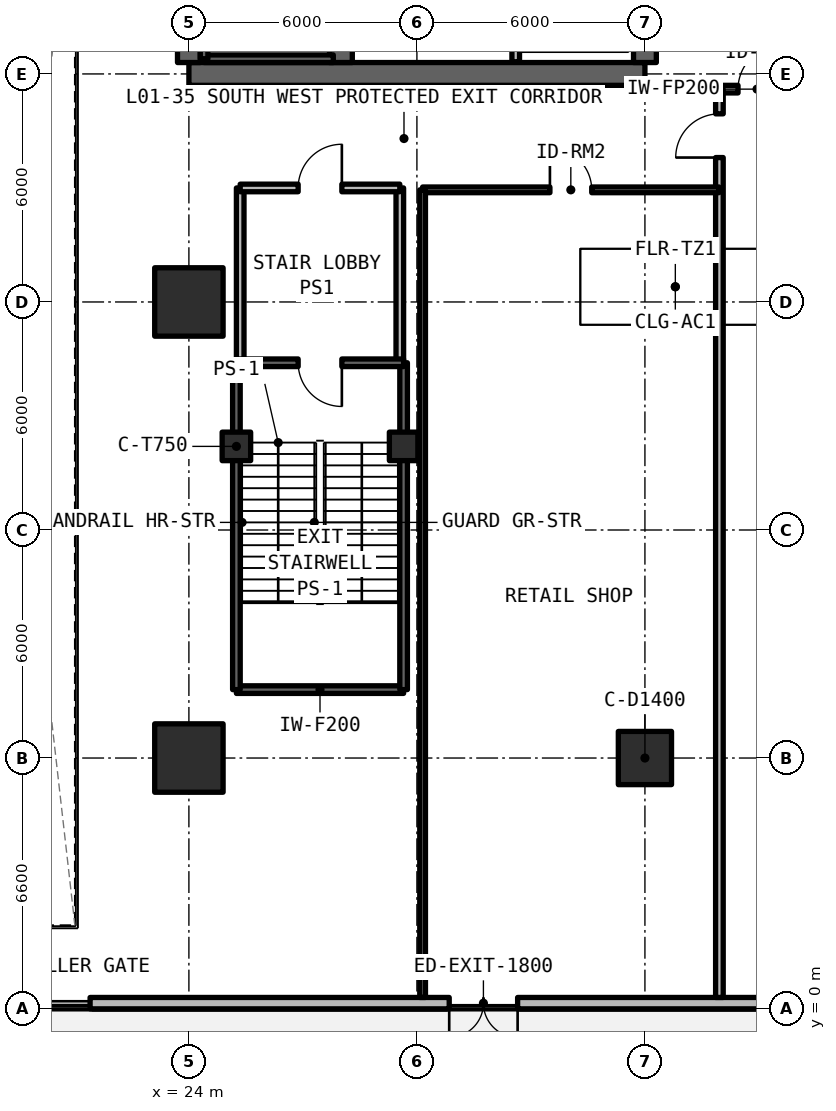
"""IFC4 building model, lengths in metres.
Left out: names, types, materials, properties, quantities, classifications, styles, units other than length and angle.
Written with IfcOpenShell. Run it as: python <this file> out.ifc"""

import sys

from ifc_helpers import new_model, si_unit, direction, frame, frame_2d, origin, origin_2d, place, context, subcontext, project, spatial, rectangle, circle, extrude, element, fill, save


model = new_model("IFC4")
c1 = context("Model", 3, precision=1e-05, world=origin(), true_north=direction((0.0, 1.0)))
c2 = subcontext(c1, "Body", "Model", "MODEL_VIEW")
j1 = project(units=[si_unit("LENGTHUNIT", "METRE"), si_unit("PLANEANGLEUNIT", "RADIAN")], contexts=[c1])
p1 = place(None, origin())
s1 = spatial("IfcSite", under=j1, at=p1, CompositionType="ELEMENT")
p2 = place(p1, origin())
s2 = spatial("IfcBuilding", under=s1, at=p2, CompositionType="ELEMENT")
p3 = place(p2, origin())
s3 = spatial("IfcBuildingStorey", under=s2, at=p3, CompositionType="ELEMENT", Elevation=0.0)
p4 = place(p3, frame((24.0, 24.6, 0.0), z_axis=(0.0, 0.0, 1.0), x_axis=(1.0, 0.0, 0.0)))
e1 = element("IfcWall", 1, at=p4, inside=s3, PredefinedType="SHEAR", context=c2, shape_type="SweptSolid", body=[
    extrude(rectangle(XDim=12.0, YDim=0.6, at=frame_2d((6.0, 0.0))), origin(), (0.0, 0.0, 1.0), 4.95),
])
p5 = place(p3, frame((24.0, 24.9, 0.0), z_axis=(0.0, 0.0, 1.0), x_axis=(0.0, 1.0, 0.0)))
e2 = element("IfcWall", 2, at=p5, inside=s3, PredefinedType="SHEAR", context=c2, shape_type="SweptSolid", body=[
    extrude(rectangle(XDim=17.4, YDim=0.6, at=frame_2d((8.7, 0.0))), origin(), (0.0, 0.0, 1.0), 4.95),
])
p6 = place(p3, frame((36.0, 24.9, 0.0), z_axis=(0.0, 0.0, 1.0), x_axis=(0.0, 1.0, 0.0)))
e3 = element("IfcWall", 3, at=p6, inside=s3, PredefinedType="SHEAR", context=c2, shape_type="SweptSolid", body=[
    extrude(rectangle(XDim=8.9, YDim=0.6, at=frame_2d((4.45, 0.0))), origin(), (0.0, 0.0, 1.0), 4.95),
])
p7 = place(p3, frame((28.0, 24.9, 0.0), z_axis=(0.0, 0.0, 1.0), x_axis=(0.0, 1.0, 0.0)))
e4 = element("IfcWall", 4, at=p7, inside=s3, PredefinedType="SHEAR", context=c2, shape_type="SweptSolid", body=[
    extrude(rectangle(XDim=17.4, YDim=0.6, at=frame_2d((8.7, 0.0))), origin(), (0.0, 0.0, 1.0), 4.95),
])
p8 = place(p7, frame((0.35, 0.0, 0.0)))
e5 = element("IfcOpeningElement", 5, at=p8, cuts=e4, PredefinedType="OPENING", context=c2, shape_type="SweptSolid", body=[
    extrude(rectangle(XDim=1.15, YDim=2.15, at=frame_2d((0.575, 1.075))), frame((0.0, 0.31, 0.0), z_axis=(0.0, -1.0, 0.0), x_axis=(1.0, 0.0, 0.0)), (0.0, 0.0, 1.0), 0.62),
])
p9 = place(p7, frame((9.55, 0.0, 0.0)))
e6 = element("IfcOpeningElement", 6, at=p9, cuts=e4, PredefinedType="OPENING", context=c2, shape_type="SweptSolid", body=[
    extrude(rectangle(XDim=1.15, YDim=2.15, at=frame_2d((0.575, 1.075))), frame((0.0, 0.31, 0.0), z_axis=(0.0, -1.0, 0.0), x_axis=(1.0, 0.0, 0.0)), (0.0, 0.0, 1.0), 0.62),
])
p10 = place(p3, frame((24.0, 6.6, 0.0), z_axis=(0.0, 0.0, 1.0), x_axis=(1.0, 0.0, 0.0)))
e7 = element("IfcColumn", 7, at=p10, inside=s3, PredefinedType="COLUMN", context=c2, shape_type="SweptSolid", body=[
    extrude(rectangle(XDim=1.8, YDim=1.8, at=origin_2d()), origin(), (0.0, 0.0, 1.0), 4.95),
])
p11 = place(p3, frame((36.0, 6.6, 0.0), z_axis=(0.0, 0.0, 1.0), x_axis=(1.0, 0.0, 0.0)))
e8 = element("IfcColumn", 8, at=p11, inside=s3, PredefinedType="COLUMN", context=c2, shape_type="SweptSolid", body=[
    extrude(circle(Radius=0.7, at=origin_2d()), origin(), (0.0, 0.0, 1.0), 4.95),
])
p12 = place(p3, frame((24.0, 18.6, 0.0), z_axis=(0.0, 0.0, 1.0), x_axis=(1.0, 0.0, 0.0)))
e9 = element("IfcColumn", 9, at=p12, inside=s3, PredefinedType="COLUMN", context=c2, shape_type="SweptSolid", body=[
    extrude(rectangle(XDim=1.8, YDim=1.8, at=origin_2d()), origin(), (0.0, 0.0, 1.0), 4.95),
])
for number, where, z_axis, x_axis in (
    (10, (25.25, 14.8, 0.0), (0.0, 0.0, 1.0), (1.0, 0.0, 0.0)),
    (11, (29.65, 14.8, 0.0), (0.0, 0.0, 1.0), (1.0, 0.0, 0.0)),
):
    element("IfcColumn", number, at=place(p3, frame(where, z_axis=z_axis, x_axis=x_axis)), inside=s3, PredefinedType="COLUMN", context=c2, shape_type="SweptSolid", body=[
        extrude(rectangle(XDim=0.75, YDim=0.75, at=origin_2d()), origin(), (0.0, 0.0, 1.0), 4.95),
    ])
p13 = place(p3, frame((0.15, 0.15, 0.0), z_axis=(0.0, 0.0, 1.0), x_axis=(1.0, 0.0, 0.0)))
e12 = element("IfcWall", 12, at=p13, inside=s3, PredefinedType="SOLIDWALL", context=c2, shape_type="SweptSolid", body=[
    extrude(rectangle(XDim=113.7, YDim=0.3, at=frame_2d((56.85, 0.0))), origin(), (0.0, 0.0, 1.0), 4.67),
])
p14 = place(p13, frame((5.75, 0.0, 0.0)))
e13 = element("IfcOpeningElement", 13, at=p14, cuts=e12, PredefinedType="OPENING", context=c2, shape_type="SweptSolid", body=[
    extrude(rectangle(XDim=1.2, YDim=2.2, at=frame_2d((0.6, 1.1))), frame((0.0, 0.16, 0.0), z_axis=(0.0, -1.0, 0.0), x_axis=(1.0, 0.0, 0.0)), (0.0, 0.0, 1.0), 0.32),
])
p15 = place(p13, frame((17.05, 0.0, 0.0)))
e14 = element("IfcOpeningElement", 14, at=p15, cuts=e12, PredefinedType="OPENING", context=c2, shape_type="SweptSolid", body=[
    extrude(rectangle(XDim=4.2, YDim=3.2, at=frame_2d((2.1, 1.6))), frame((0.0, 0.16, 0.0), z_axis=(0.0, -1.0, 0.0), x_axis=(1.0, 0.0, 0.0)), (0.0, 0.0, 1.0), 0.32),
])
p16 = place(p13, frame((30.7, 0.0, 0.0)))
e15 = element("IfcOpeningElement", 15, at=p16, cuts=e12, PredefinedType="OPENING", context=c2, shape_type="SweptSolid", body=[
    extrude(rectangle(XDim=1.8, YDim=2.25, at=frame_2d((0.9, 1.125))), frame((0.0, 0.16, 0.0), z_axis=(0.0, -1.0, 0.0), x_axis=(1.0, 0.0, 0.0)), (0.0, 0.0, 1.0), 0.32),
])
p17 = place(p13, frame((40.95, 0.0, 0.0)))
e16 = element("IfcOpeningElement", 16, at=p17, cuts=e12, PredefinedType="OPENING", context=c2, shape_type="SweptSolid", body=[
    extrude(rectangle(XDim=1.8, YDim=2.25, at=frame_2d((0.9, 1.125))), frame((0.0, 0.16, 0.0), z_axis=(0.0, -1.0, 0.0), x_axis=(1.0, 0.0, 0.0)), (0.0, 0.0, 1.0), 0.32),
])
p18 = place(p13, frame((55.75, 0.0, 0.0)))
e17 = element("IfcOpeningElement", 17, at=p18, cuts=e12, PredefinedType="OPENING", context=c2, shape_type="SweptSolid", body=[
    extrude(rectangle(XDim=2.2, YDim=2.6, at=frame_2d((1.1, 1.3))), frame((0.0, 0.16, 0.0), z_axis=(0.0, -1.0, 0.0), x_axis=(1.0, 0.0, 0.0)), (0.0, 0.0, 1.0), 0.32),
])
p19 = place(p13, frame((74.45, 0.0, 0.0)))
e18 = element("IfcOpeningElement", 18, at=p19, cuts=e12, PredefinedType="OPENING", context=c2, shape_type="SweptSolid", body=[
    extrude(rectangle(XDim=1.8, YDim=2.25, at=frame_2d((0.9, 1.125))), frame((0.0, 0.16, 0.0), z_axis=(0.0, -1.0, 0.0), x_axis=(1.0, 0.0, 0.0)), (0.0, 0.0, 1.0), 0.32),
])
p20 = place(p13, frame((106.25, 0.0, 0.0)))
e19 = element("IfcOpeningElement", 19, at=p20, cuts=e12, PredefinedType="OPENING", context=c2, shape_type="SweptSolid", body=[
    extrude(rectangle(XDim=1.2, YDim=2.2, at=frame_2d((0.6, 1.1))), frame((0.0, 0.16, 0.0), z_axis=(0.0, -1.0, 0.0), x_axis=(1.0, 0.0, 0.0)), (0.0, 0.0, 1.0), 0.32),
])
p21 = place(p13, frame((68.18, 0.0, 0.78)))
e20 = element("IfcOpeningElement", 20, at=p21, cuts=e12, PredefinedType="OPENING", context=c2, shape_type="SweptSolid", body=[
    extrude(rectangle(XDim=2.4, YDim=1.66, at=frame_2d((1.2, 0.83))), frame((0.0, 0.16, 0.0), z_axis=(0.0, -1.0, 0.0), x_axis=(1.0, 0.0, 0.0)), (0.0, 0.0, 1.0), 0.32),
])
p22 = place(p13, frame((8.15, 0.0, 0.78)))
e21 = element("IfcOpeningElement", 21, at=p22, cuts=e12, PredefinedType="OPENING", context=c2, shape_type="SweptSolid", body=[
    extrude(rectangle(XDim=2.4, YDim=1.66, at=frame_2d((1.2, 0.83))), frame((0.0, 0.16, 0.0), z_axis=(0.0, -1.0, 0.0), x_axis=(1.0, 0.0, 0.0)), (0.0, 0.0, 1.0), 0.32),
])
p23 = place(p13, frame((84.15, 0.0, 0.78)))
e22 = element("IfcOpeningElement", 22, at=p23, cuts=e12, PredefinedType="OPENING", context=c2, shape_type="SweptSolid", body=[
    extrude(rectangle(XDim=2.4, YDim=1.66, at=frame_2d((1.2, 0.83))), frame((0.0, 0.16, 0.0), z_axis=(0.0, -1.0, 0.0), x_axis=(1.0, 0.0, 0.0)), (0.0, 0.0, 1.0), 0.32),
])
p24 = place(p13, frame((93.65, 0.0, 0.78)))
e23 = element("IfcOpeningElement", 23, at=p24, cuts=e12, PredefinedType="OPENING", context=c2, shape_type="SweptSolid", body=[
    extrude(rectangle(XDim=2.4, YDim=1.66, at=frame_2d((1.2, 0.83))), frame((0.0, 0.16, 0.0), z_axis=(0.0, -1.0, 0.0), x_axis=(1.0, 0.0, 0.0)), (0.0, 0.0, 1.0), 0.32),
])
p25 = place(p13, frame((103.15, 0.0, 0.78)))
e24 = element("IfcOpeningElement", 24, at=p25, cuts=e12, PredefinedType="OPENING", context=c2, shape_type="SweptSolid", body=[
    extrude(rectangle(XDim=2.4, YDim=1.66, at=frame_2d((1.2, 0.83))), frame((0.0, 0.16, 0.0), z_axis=(0.0, -1.0, 0.0), x_axis=(1.0, 0.0, 0.0)), (0.0, 0.0, 1.0), 0.32),
])
p26 = place(p3, frame((32.6, 24.92, 0.0), z_axis=(0.0, 0.0, 1.0), x_axis=(0.0, 1.0, 0.0)))
e25 = element("IfcWall", 25, at=p26, inside=s3, PredefinedType="SOLIDWALL", context=c2, shape_type="SweptSolid", body=[
    extrude(rectangle(XDim=3.58, YDim=0.2, at=frame_2d((1.79, 0.0))), origin(), (0.0, 0.0, 1.0), 3.89),
])
p27 = place(p26, frame((1.3, 0.0, 0.0)))
e26 = element("IfcOpeningElement", 26, at=p27, cuts=e25, PredefinedType="OPENING", context=c2, shape_type="SweptSolid", body=[
    extrude(rectangle(XDim=1.1, YDim=2.2, at=frame_2d((0.55, 1.1))), frame((0.0, 0.11, 0.0), z_axis=(0.0, -1.0, 0.0), x_axis=(1.0, 0.0, 0.0)), (0.0, 0.0, 1.0), 0.22),
])
p28 = place(p3, frame((38.0, 24.2, 0.0), z_axis=(0.0, 0.0, 1.0), x_axis=(1.0, 0.0, 0.0)))
e27 = element("IfcWall", 27, at=p28, inside=s3, PredefinedType="SOLIDWALL", context=c2, shape_type="SweptSolid", body=[
    extrude(rectangle(XDim=1.9, YDim=0.2, at=frame_2d((0.95, 0.0))), origin(), (0.0, 0.0, 1.0), 3.89),
])
p29 = place(p28, frame((0.45, 0.0, 0.0)))
e28 = element("IfcOpeningElement", 28, at=p29, cuts=e27, PredefinedType="OPENING", context=c2, shape_type="SweptSolid", body=[
    extrude(rectangle(XDim=1.15, YDim=2.15, at=frame_2d((0.575, 1.075))), frame((0.0, 0.11, 0.0), z_axis=(0.0, -1.0, 0.0), x_axis=(1.0, 0.0, 0.0)), (0.0, 0.0, 1.0), 0.22),
])
for number, where, z_axis, x_axis in (
    (29, (25.35, 17.0, 0.0), (0.0, 0.0, 1.0), (0.0, 1.0, 0.0)),
    (30, (29.55, 17.0, 0.0), (0.0, 0.0, 1.0), (0.0, 1.0, 0.0)),
):
    element("IfcWall", number, at=place(p3, frame(where, z_axis=z_axis, x_axis=x_axis)), inside=s3, PredefinedType="SOLIDWALL", context=c2, shape_type="SweptSolid", body=[
        extrude(rectangle(XDim=4.6, YDim=0.2, at=frame_2d((2.3, 0.0))), origin(), (0.0, 0.0, 1.0), 3.89),
    ])
p30 = place(p3, frame((25.35, 21.6, 0.0), z_axis=(0.0, 0.0, 1.0), x_axis=(1.0, 0.0, 0.0)))
e31 = element("IfcWall", 31, at=p30, inside=s3, PredefinedType="SOLIDWALL", context=c2, shape_type="SweptSolid", body=[
    extrude(rectangle(XDim=4.2, YDim=0.2, at=frame_2d((2.1, 0.0))), origin(), (0.0, 0.0, 1.0), 3.89),
])
p31 = place(p30, frame((1.525, 0.0, 0.0)))
e32 = element("IfcOpeningElement", 32, at=p31, cuts=e31, PredefinedType="OPENING", context=c2, shape_type="SweptSolid", body=[
    extrude(rectangle(XDim=1.15, YDim=2.15, at=frame_2d((0.575, 1.075))), frame((0.0, 0.11, 0.0), z_axis=(0.0, -1.0, 0.0), x_axis=(1.0, 0.0, 0.0)), (0.0, 0.0, 1.0), 0.22),
])
p32 = place(p3, frame((37.96, 0.3, 0.0), z_axis=(0.0, 0.0, 1.0), x_axis=(0.0, 1.0, 0.0)))
e33 = element("IfcWall", 33, at=p32, inside=s3, PredefinedType="SOLIDWALL", context=c2, shape_type="SweptSolid", body=[
    extrude(rectangle(XDim=23.9, YDim=0.2, at=frame_2d((11.95, 0.0))), origin(), (0.0, 0.0, 1.0), 3.89),
])
p33 = place(p32, frame((22.1, 0.0, 0.0)))
e34 = element("IfcOpeningElement", 34, at=p33, cuts=e33, PredefinedType="OPENING", context=c2, shape_type="SweptSolid", body=[
    extrude(rectangle(XDim=1.15, YDim=2.15, at=frame_2d((0.575, 1.075))), frame((0.0, 0.11, 0.0), z_axis=(0.0, -1.0, 0.0), x_axis=(1.0, 0.0, 0.0)), (0.0, 0.0, 1.0), 0.22),
])
p34 = place(p3, frame((30.15, 21.55, 0.0), z_axis=(0.0, 0.0, 1.0), x_axis=(1.0, 0.0, 0.0)))
e35 = element("IfcWall", 35, at=p34, inside=s3, PredefinedType="SOLIDWALL", context=c2, shape_type="SweptSolid", body=[
    extrude(rectangle(XDim=7.8, YDim=0.15, at=frame_2d((3.9, 0.0))), origin(), (0.0, 0.0, 1.0), 3.89),
])
p35 = place(p34, frame((3.35, 0.0, 0.0)))
e36 = element("IfcOpeningElement", 36, at=p35, cuts=e35, PredefinedType="OPENING", context=c2, shape_type="SweptSolid", body=[
    extrude(rectangle(XDim=1.1, YDim=2.15, at=frame_2d((0.55, 1.075))), frame((0.0, 0.085, 0.0), z_axis=(0.0, -1.0, 0.0), x_axis=(1.0, 0.0, 0.0)), (0.0, 0.0, 1.0), 0.17),
])
p36 = place(p3, frame((30.15, 0.3, 0.0), z_axis=(0.0, 0.0, 1.0), x_axis=(0.0, 1.0, 0.0)))
e37 = element("IfcWall", 37, at=p36, inside=s3, PredefinedType="SOLIDWALL", context=c2, shape_type="SweptSolid", body=[
    extrude(rectangle(XDim=21.25, YDim=0.15, at=frame_2d((10.625, 0.0))), origin(), (0.0, 0.0, 1.0), 3.89),
])
p37 = place(p3, frame((24.4, 25.0, 0.0), z_axis=(0.0, 0.0, 1.0), x_axis=(1.0, 0.0, 0.0)))
e38 = element("IfcWall", 38, at=p37, inside=s3, PredefinedType="SOLIDWALL", context=c2, shape_type="SweptSolid", body=[
    extrude(rectangle(XDim=3.4, YDim=0.2, at=frame_2d((1.7, 0.0))), origin(), (0.0, 0.0, 1.0), 4.95),
])
p38 = place(p3, frame((24.4, 33.0, 0.0), z_axis=(0.0, 0.0, 1.0), x_axis=(0.0, -1.0, 0.0)))
e39 = element("IfcWall", 39, at=p38, inside=s3, PredefinedType="SOLIDWALL", context=c2, shape_type="SweptSolid", body=[
    extrude(rectangle(XDim=8.0, YDim=0.2, at=frame_2d((4.0, 0.0))), origin(), (0.0, 0.0, 1.0), 4.95),
])
p39 = place(p3, frame((25.25, 8.4, 0.0), z_axis=(0.0, 0.0, 1.0), x_axis=(1.0, 0.0, 0.0)))
e40 = element("IfcWall", 40, at=p39, inside=s3, PredefinedType="SOLIDWALL", context=c2, shape_type="SweptSolid", body=[
    extrude(rectangle(XDim=4.4, YDim=0.2, at=frame_2d((2.2, 0.0))), origin(), (0.0, 0.0, 1.0), 4.95),
])
p40 = place(p3, frame((29.65, 8.4, 0.0), z_axis=(0.0, 0.0, 1.0), x_axis=(0.0, 1.0, 0.0)))
e41 = element("IfcWall", 41, at=p40, inside=s3, PredefinedType="SOLIDWALL", context=c2, shape_type="SweptSolid", body=[
    extrude(rectangle(XDim=8.6, YDim=0.2, at=frame_2d((4.3, 0.0))), origin(), (0.0, 0.0, 1.0), 4.95),
])
p41 = place(p3, frame((29.65, 17.0, 0.0), z_axis=(0.0, 0.0, 1.0), x_axis=(-1.0, 0.0, 0.0)))
e42 = element("IfcWall", 42, at=p41, inside=s3, PredefinedType="SOLIDWALL", context=c2, shape_type="SweptSolid", body=[
    extrude(rectangle(XDim=4.4, YDim=0.2, at=frame_2d((2.2, 0.0))), origin(), (0.0, 0.0, 1.0), 4.95),
])
p42 = place(p41, frame((1.625, 0.0, 0.0)))
e43 = element("IfcOpeningElement", 43, at=p42, cuts=e42, PredefinedType="OPENING", context=c2, shape_type="SweptSolid", body=[
    extrude(rectangle(XDim=1.15, YDim=2.15, at=frame_2d((0.575, 1.075))), frame((0.0, 0.11, 0.0), z_axis=(0.0, -1.0, 0.0), x_axis=(1.0, 0.0, 0.0)), (0.0, 0.0, 1.0), 0.22),
])
p43 = place(p3, frame((25.25, 17.0, 0.0), z_axis=(0.0, 0.0, 1.0), x_axis=(0.0, -1.0, 0.0)))
e44 = element("IfcWall", 44, at=p43, inside=s3, PredefinedType="SOLIDWALL", context=c2, shape_type="SweptSolid", body=[
    extrude(rectangle(XDim=8.6, YDim=0.2, at=frame_2d((4.3, 0.0))), origin(), (0.0, 0.0, 1.0), 4.95),
])
p44 = place(p15, origin())
e45 = element("IfcDoor", 45, at=p44, inside=s3, OperationType="SINGLE_SWING_LEFT", PredefinedType="GATE", context=c2, shape_type="SweptSolid", body=[
    extrude(rectangle(XDim=4.2, YDim=3.2, at=frame_2d((2.1, 1.6))), frame((0.0, 0.025, 0.0), z_axis=(0.0, -1.0, 0.0), x_axis=(1.0, 0.0, 0.0)), (0.0, 0.0, 1.0), 0.05),
])
fill(e14, e45)
p45 = place(p16, frame((1.8, 0.0, 0.0), z_axis=(0.0, 0.0, 1.0), x_axis=(-1.0, 0.0, 0.0)))
e46 = element("IfcDoor", 46, at=p45, inside=s3, OperationType="SINGLE_SWING_RIGHT", PredefinedType="DOOR", context=c2, shape_type="SweptSolid", body=[
    extrude(rectangle(XDim=1.8, YDim=2.25, at=frame_2d((0.9, 1.125))), frame((0.0, 0.025, 0.0), z_axis=(0.0, -1.0, 0.0), x_axis=(1.0, 0.0, 0.0)), (0.0, 0.0, 1.0), 0.05),
])
fill(e15, e46)
p46 = place(p29, frame((1.15, 0.0, 0.0), z_axis=(0.0, 0.0, 1.0), x_axis=(-1.0, 0.0, 0.0)))
e47 = element("IfcDoor", 47, at=p46, inside=s3, OperationType="SINGLE_SWING_RIGHT", PredefinedType="DOOR", context=c2, shape_type="SweptSolid", body=[
    extrude(rectangle(XDim=1.15, YDim=2.15, at=frame_2d((0.575, 1.075))), frame((0.0, 0.025, 0.0), z_axis=(0.0, -1.0, 0.0), x_axis=(1.0, 0.0, 0.0)), (0.0, 0.0, 1.0), 0.05),
])
fill(e28, e47)
p47 = place(p31, origin())
e48 = element("IfcDoor", 48, at=p47, inside=s3, OperationType="SINGLE_SWING_RIGHT", PredefinedType="DOOR", context=c2, shape_type="SweptSolid", body=[
    extrude(rectangle(XDim=1.15, YDim=2.15, at=frame_2d((0.575, 1.075))), frame((0.0, 0.025, 0.0), z_axis=(0.0, -1.0, 0.0), x_axis=(1.0, 0.0, 0.0)), (0.0, 0.0, 1.0), 0.05),
])
fill(e32, e48)
p48 = place(p33, frame((1.15, 0.0, 0.0), z_axis=(0.0, 0.0, 1.0), x_axis=(-1.0, 0.0, 0.0)))
e49 = element("IfcDoor", 49, at=p48, inside=s3, OperationType="SINGLE_SWING_LEFT", PredefinedType="DOOR", context=c2, shape_type="SweptSolid", body=[
    extrude(rectangle(XDim=1.15, YDim=2.15, at=frame_2d((0.575, 1.075))), frame((0.0, 0.025, 0.0), z_axis=(0.0, -1.0, 0.0), x_axis=(1.0, 0.0, 0.0)), (0.0, 0.0, 1.0), 0.05),
])
fill(e34, e49)
p49 = place(p35, frame((1.1, 0.0, 0.0), z_axis=(0.0, 0.0, 1.0), x_axis=(-1.0, 0.0, 0.0)))
e50 = element("IfcDoor", 50, at=p49, inside=s3, OperationType="SINGLE_SWING_LEFT", PredefinedType="DOOR", context=c2, shape_type="SweptSolid", body=[
    extrude(rectangle(XDim=1.1, YDim=2.15, at=frame_2d((0.55, 1.075))), frame((0.0, 0.025, 0.0), z_axis=(0.0, -1.0, 0.0), x_axis=(1.0, 0.0, 0.0)), (0.0, 0.0, 1.0), 0.05),
])
fill(e36, e50)
p50 = place(p42, frame((1.15, 0.0, 0.0), z_axis=(0.0, 0.0, 1.0), x_axis=(-1.0, 0.0, 0.0)))
e51 = element("IfcDoor", 51, at=p50, inside=s3, OperationType="SINGLE_SWING_LEFT", PredefinedType="DOOR", context=c2, shape_type="SweptSolid", body=[
    extrude(rectangle(XDim=1.15, YDim=2.15, at=frame_2d((0.575, 1.075))), frame((0.0, 0.025, 0.0), z_axis=(0.0, -1.0, 0.0), x_axis=(1.0, 0.0, 0.0)), (0.0, 0.0, 1.0), 0.05),
])
fill(e43, e51)
save(model, sys.argv[1])
